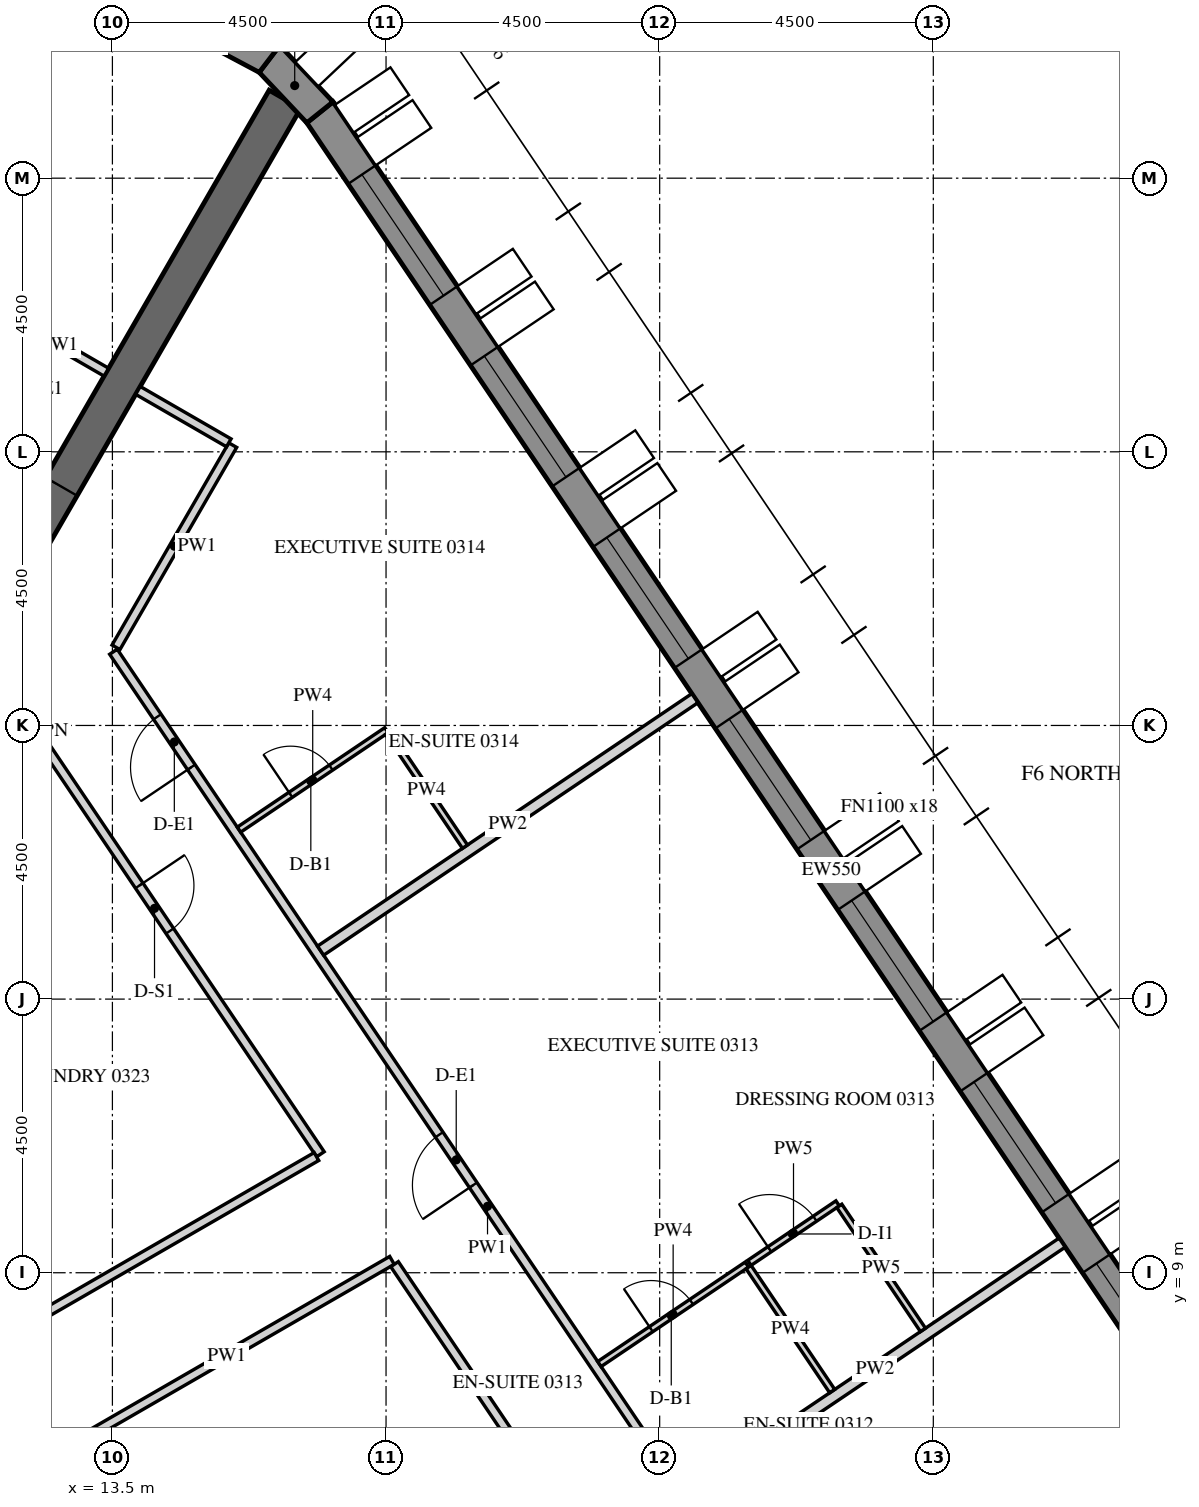
"""IFC4 building model, lengths in metres.
Left out: names, types, materials, properties, quantities, classifications, styles, units other than length and angle.
Written with IfcOpenShell. Run it as: python <this file> out.ifc"""

import sys

from ifc_helpers import new_model, si_unit, direction, frame, frame_2d, origin, place, context, subcontext, project, spatial, polyline, rectangle, outline, extrude, element, fill, save


model = new_model("IFC4")
c1 = context("Model", 3, precision=1e-05, world=origin(), true_north=direction((0.0, 1.0)))
c2 = subcontext(c1, "Body", "Model", "MODEL_VIEW")
j1 = project(units=[si_unit("LENGTHUNIT", "METRE"), si_unit("PLANEANGLEUNIT", "RADIAN")], contexts=[c1])
p1 = place(None, origin())
s1 = spatial("IfcSite", under=j1, at=p1, CompositionType="ELEMENT")
p2 = place(p1, origin())
s2 = spatial("IfcBuilding", under=s1, at=p2, CompositionType="ELEMENT")
p3 = place(p2, frame((0.0, 0.0, 60.9)))
s3 = spatial("IfcBuildingStorey", under=s2, at=p3, CompositionType="ELEMENT", Elevation=60.9)
p4 = place(p3, frame((33.728, 3.153, -0.15), z_axis=(0.0, 0.0, 1.0), x_axis=(-0.559192411416, 0.82903790445, 0.0)))
e1 = element("IfcWall", 1, at=p4, inside=s3, PredefinedType="SOLIDWALL", context=c2, shape_type="SweptSolid", body=[
    extrude(outline(polyline([(-0.026, -0.275), (30.093, -0.275), (30.048, 0.275), (0.026, 0.275), (-0.026, -0.275)])), origin(), (0.0, 0.0, 1.0), 3.9),
])
p5 = place(p4, frame((1.236, 0.0, 1.05)))
e2 = element("IfcOpeningElement", 2, at=p5, cuts=e1, PredefinedType="OPENING", context=c2, shape_type="SweptSolid", body=[
    extrude(rectangle(XDim=2.4, YDim=2.4, at=frame_2d((1.2, 1.2))), frame((0.0, 0.285, 0.0), z_axis=(0.0, -1.0, 0.0), x_axis=(1.0, 0.0, 0.0)), (0.0, 0.0, 1.0), 0.57),
])
p6 = place(p4, frame((4.835, 0.0, 1.05)))
e3 = element("IfcOpeningElement", 3, at=p6, cuts=e1, PredefinedType="OPENING", context=c2, shape_type="SweptSolid", body=[
    extrude(rectangle(XDim=2.4, YDim=2.4, at=frame_2d((1.2, 1.2))), frame((0.0, 0.285, 0.0), z_axis=(0.0, -1.0, 0.0), x_axis=(1.0, 0.0, 0.0)), (0.0, 0.0, 1.0), 0.57),
])
p7 = place(p4, frame((8.436, 0.0, 1.05)))
e4 = element("IfcOpeningElement", 4, at=p7, cuts=e1, PredefinedType="OPENING", context=c2, shape_type="SweptSolid", body=[
    extrude(rectangle(XDim=2.4, YDim=2.4, at=frame_2d((1.2, 1.2))), frame((0.0, 0.285, 0.0), z_axis=(0.0, -1.0, 0.0), x_axis=(1.0, 0.0, 0.0)), (0.0, 0.0, 1.0), 0.57),
])
p8 = place(p4, frame((12.035, 0.0, 1.05)))
e5 = element("IfcOpeningElement", 5, at=p8, cuts=e1, PredefinedType="OPENING", context=c2, shape_type="SweptSolid", body=[
    extrude(rectangle(XDim=2.4, YDim=2.4, at=frame_2d((1.2, 1.2))), frame((0.0, 0.285, 0.0), z_axis=(0.0, -1.0, 0.0), x_axis=(1.0, 0.0, 0.0)), (0.0, 0.0, 1.0), 0.57),
])
p9 = place(p4, frame((15.635, 0.0, 1.05)))
e6 = element("IfcOpeningElement", 6, at=p9, cuts=e1, PredefinedType="OPENING", context=c2, shape_type="SweptSolid", body=[
    extrude(rectangle(XDim=2.4, YDim=2.4, at=frame_2d((1.2, 1.2))), frame((0.0, 0.285, 0.0), z_axis=(0.0, -1.0, 0.0), x_axis=(1.0, 0.0, 0.0)), (0.0, 0.0, 1.0), 0.57),
])
p10 = place(p4, frame((19.236, 0.0, 1.05)))
e7 = element("IfcOpeningElement", 7, at=p10, cuts=e1, PredefinedType="OPENING", context=c2, shape_type="SweptSolid", body=[
    extrude(rectangle(XDim=2.4, YDim=2.4, at=frame_2d((1.2, 1.2))), frame((0.0, 0.285, 0.0), z_axis=(0.0, -1.0, 0.0), x_axis=(1.0, 0.0, 0.0)), (0.0, 0.0, 1.0), 0.57),
])
p11 = place(p4, frame((22.835, 0.0, 1.05)))
e8 = element("IfcOpeningElement", 8, at=p11, cuts=e1, PredefinedType="OPENING", context=c2, shape_type="SweptSolid", body=[
    extrude(rectangle(XDim=2.4, YDim=2.4, at=frame_2d((1.2, 1.2))), frame((0.0, 0.285, 0.0), z_axis=(0.0, -1.0, 0.0), x_axis=(1.0, 0.0, 0.0)), (0.0, 0.0, 1.0), 0.57),
])
p12 = place(p4, frame((26.436, 0.0, 1.05)))
e9 = element("IfcOpeningElement", 9, at=p12, cuts=e1, PredefinedType="OPENING", context=c2, shape_type="SweptSolid", body=[
    extrude(rectangle(XDim=2.4, YDim=2.4, at=frame_2d((1.2, 1.2))), frame((0.0, 0.285, 0.0), z_axis=(0.0, -1.0, 0.0), x_axis=(1.0, 0.0, 0.0)), (0.0, 0.0, 1.0), 0.57),
])
p13 = place(p3, frame((16.913, 28.083, -0.15), z_axis=(0.0, 0.0, 1.0), x_axis=(-0.686196220404, 0.727416488061, 0.0)))
e10 = element("IfcWall", 10, at=p13, inside=s3, PredefinedType="SOLIDWALL", context=c2, shape_type="SweptSolid", body=[
    extrude(outline(polyline([(-0.022, -0.275), (1.253, -0.275), (1.163, 0.275), (0.022, 0.275), (-0.022, -0.275)])), origin(), (0.0, 0.0, 1.0), 3.9),
])
p14 = place(p3, frame((16.083, 28.962, -0.15), z_axis=(0.0, 0.0, 1.0), x_axis=(-0.882995347911, 0.469381737574, 0.0)))
e11 = element("IfcWall", 11, at=p14, inside=s3, PredefinedType="SOLIDWALL", context=c2, shape_type="SweptSolid", body=[
    extrude(outline(polyline([(-0.045, -0.275), (1.253, -0.275), (1.163, 0.275), (0.045, 0.275), (-0.045, -0.275)])), origin(), (0.0, 0.0, 1.0), 3.9),
])
p15 = place(p3, frame((15.819, 0.0, -0.15), z_axis=(0.0, 0.0, 1.0), x_axis=(-0.499999880136, 0.866025472988, 0.0)))
e12 = element("IfcWall", 12, at=p15, inside=s3, PredefinedType="SHEAR", context=c2, shape_type="SweptSolid", body=[
    extrude(outline(polyline([(-0.173, -0.3), (15.993, -0.3), (15.646, 0.3), (0.173, 0.3), (-0.173, -0.3)])), origin(), (0.0, 0.0, 1.0), 3.9),
])
p16 = place(p15, frame((6.981, 0.0, 0.15)))
e13 = element("IfcOpeningElement", 13, at=p16, cuts=e12, PredefinedType="OPENING", context=c2, shape_type="SweptSolid", body=[
    extrude(rectangle(XDim=1.8, YDim=2.4, at=frame_2d((0.9, 1.2))), frame((0.0, 0.31, 0.0), z_axis=(0.0, -1.0, 0.0), x_axis=(1.0, 0.0, 0.0)), (0.0, 0.0, 1.0), 0.62),
])
p17 = place(p3, frame((8.083, 14.0, -0.15), z_axis=(0.0, 0.0, 1.0), x_axis=(0.499997680643, 0.866026742862, 0.0)))
e14 = element("IfcWall", 14, at=p17, inside=s3, PredefinedType="SHEAR", context=c2, shape_type="SweptSolid", body=[
    extrude(rectangle(XDim=16.509, YDim=0.6, at=frame_2d((8.254, 0.0))), origin(), (0.0, 0.0, 1.0), 3.9),
])
p18 = place(p17, frame((7.354, 0.0, 0.15)))
e15 = element("IfcOpeningElement", 15, at=p18, cuts=e14, PredefinedType="OPENING", context=c2, shape_type="SweptSolid", body=[
    extrude(rectangle(XDim=1.8, YDim=2.4, at=frame_2d((0.9, 1.2))), frame((0.0, 0.31, 0.0), z_axis=(0.0, -1.0, 0.0), x_axis=(1.0, 0.0, 0.0)), (0.0, 0.0, 1.0), 0.62),
])
p19 = place(p3, frame((13.4, 23.81, 0.0), z_axis=(0.0, 0.0, 1.0), x_axis=(-0.865989075817, 0.500062916607, 0.0)))
e16 = element("IfcWall", 16, at=p19, inside=s3, PredefinedType="PARTITIONING", context=c2, shape_type="SweptSolid", body=[
    extrude(rectangle(XDim=1.8, YDim=0.15, at=frame_2d((0.9, 0.0))), origin(), (0.0, 0.0, 1.0), 2.988),
])
p20 = place(p3, frame((25.821, 0.972, 0.0), z_axis=(0.0, 0.0, 1.0), x_axis=(-0.559201442833, 0.829031812619, 0.0)))
e17 = element("IfcWall", 17, at=p20, inside=s3, PredefinedType="PARTITIONING", context=c2, shape_type="SweptSolid", body=[
    extrude(rectangle(XDim=22.002, YDim=0.15, at=frame_2d((11.001, 0.0))), origin(), (0.0, 0.0, 1.0), 2.988),
])
p21 = place(p20, frame((0.769, 0.0, 0.0)))
e18 = element("IfcOpeningElement", 18, at=p21, cuts=e17, PredefinedType="OPENING", context=c2, shape_type="SweptSolid", body=[
    extrude(rectangle(XDim=1.0, YDim=2.1, at=frame_2d((0.5, 1.05))), frame((0.0, 0.085, 0.0), z_axis=(0.0, -1.0, 0.0), x_axis=(1.0, 0.0, 0.0)), (0.0, 0.0, 1.0), 0.17),
])
p22 = place(p20, frame((11.421, 0.0, 0.0)))
e19 = element("IfcOpeningElement", 19, at=p22, cuts=e17, PredefinedType="OPENING", context=c2, shape_type="SweptSolid", body=[
    extrude(rectangle(XDim=1.0, YDim=2.1, at=frame_2d((0.5, 1.05))), frame((0.0, 0.085, 0.0), z_axis=(0.0, -1.0, 0.0), x_axis=(1.0, 0.0, 0.0)), (0.0, 0.0, 1.0), 0.17),
])
p23 = place(p20, frame((19.711, 0.0, 0.0)))
e20 = element("IfcOpeningElement", 20, at=p23, cuts=e17, PredefinedType="OPENING", context=c2, shape_type="SweptSolid", body=[
    extrude(rectangle(XDim=1.0, YDim=2.1, at=frame_2d((0.5, 1.05))), frame((0.0, 0.085, 0.0), z_axis=(0.0, -1.0, 0.0), x_axis=(1.0, 0.0, 0.0)), (0.0, 0.0, 1.0), 0.17),
])
p24 = place(p3, frame((13.559, 19.285, 0.0), z_axis=(0.0, 0.0, 1.0), x_axis=(0.499975646431, 0.866039463868, 0.0)))
e21 = element("IfcWall", 21, at=p24, inside=s3, PredefinedType="PARTITIONING", context=c2, shape_type="SweptSolid", body=[
    extrude(rectangle(XDim=3.84, YDim=0.15, at=frame_2d((1.92, 0.0))), origin(), (0.0, 0.0, 1.0), 2.988),
])
p25 = place(p3, frame((15.414, 22.648, 0.0), z_axis=(0.0, 0.0, 1.0), x_axis=(-0.866074815912, 0.499914405916, 0.0)))
e22 = element("IfcWall", 22, at=p25, inside=s3, PredefinedType="PARTITIONING", context=c2, shape_type="SweptSolid", body=[
    extrude(rectangle(XDim=1.725, YDim=0.15, at=frame_2d((0.862, 0.0))), origin(), (0.0, 0.0, 1.0), 2.988),
])
p26 = place(p3, frame((12.664, 6.066, 0.0), z_axis=(0.0, 0.0, 1.0), x_axis=(0.866036561919, 0.499980673046, 0.0)))
e23 = element("IfcWall", 23, at=p26, inside=s3, PredefinedType="PARTITIONING", context=c2, shape_type="SweptSolid", body=[
    extrude(rectangle(XDim=6.275, YDim=0.15, at=frame_2d((3.137, 0.0))), origin(), (0.0, 0.0, 1.0), 2.988),
])
p27 = place(p3, frame((18.14, 9.141, 0.0), z_axis=(0.0, 0.0, 1.0), x_axis=(0.55918799196, -0.829040885389, 0.0)))
e24 = element("IfcWall", 24, at=p27, inside=s3, PredefinedType="PARTITIONING", context=c2, shape_type="SweptSolid", body=[
    extrude(rectangle(XDim=10.025, YDim=0.15, at=frame_2d((5.013, 0.0))), origin(), (0.0, 0.0, 1.0), 2.988),
])
p28 = place(p3, frame((11.465, 19.037, 0.0), z_axis=(0.0, 0.0, 1.0), x_axis=(0.559196064773, -0.829035440221, 0.0)))
e25 = element("IfcWall", 25, at=p28, inside=s3, PredefinedType="PARTITIONING", context=c2, shape_type="SweptSolid", body=[
    extrude(rectangle(XDim=9.757, YDim=0.15, at=frame_2d((4.878, 0.0))), origin(), (0.0, 0.0, 1.0), 2.988),
])
p29 = place(p28, frame((4.428, 0.0, 0.0)))
e26 = element("IfcOpeningElement", 26, at=p29, cuts=e25, PredefinedType="OPENING", context=c2, shape_type="SweptSolid", body=[
    extrude(rectangle(XDim=0.9, YDim=2.1, at=frame_2d((0.45, 1.05))), frame((0.0, 0.085, 0.0), z_axis=(0.0, -1.0, 0.0), x_axis=(1.0, 0.0, 0.0)), (0.0, 0.0, 1.0), 0.17),
])
p30 = place(p3, frame((16.855, 10.911, 0.0), z_axis=(0.0, 0.0, 1.0), x_axis=(-0.866020343444, -0.500008764664, 0.0)))
e27 = element("IfcWall", 27, at=p30, inside=s3, PredefinedType="PARTITIONING", context=c2, shape_type="SweptSolid", body=[
    extrude(rectangle(XDim=6.053, YDim=0.15, at=frame_2d((3.026, 0.0))), origin(), (0.0, 0.0, 1.0), 2.988),
])
p31 = place(p3, frame((23.159, 5.053, 0.0), z_axis=(0.0, 0.0, 1.0), x_axis=(0.829047014003, 0.559178905694, 0.0)))
e28 = element("IfcWall", 28, at=p31, inside=s3, PredefinedType="PARTITIONING", context=c2, shape_type="SweptSolid", body=[
    extrude(rectangle(XDim=2.725, YDim=0.1, at=frame_2d((1.362, 0.0))), origin(), (0.0, 0.0, 1.0), 2.988),
])
p32 = place(p3, frame((25.446, 6.535, 0.0), z_axis=(0.0, 0.0, 1.0), x_axis=(0.559176864802, -0.829048390548, 0.0)))
e29 = element("IfcWall", 29, at=p32, inside=s3, PredefinedType="PARTITIONING", context=c2, shape_type="SweptSolid", body=[
    extrude(rectangle(XDim=2.55, YDim=0.1, at=frame_2d((1.275, 0.0))), origin(), (0.0, 0.0, 1.0), 2.988),
])
p33 = place(p3, frame((29.119, 9.495, 0.0), z_axis=(0.0, 0.0, 1.0), x_axis=(-0.829038452737, -0.559191598545, 0.0)))
e30 = element("IfcWall", 30, at=p33, inside=s3, PredefinedType="PARTITIONING", context=c2, shape_type="SweptSolid", body=[
    extrude(rectangle(XDim=7.425, YDim=0.18, at=frame_2d((3.713, 0.0))), origin(), (0.0, 0.0, 1.0), 2.988),
])
p34 = place(p3, frame((21.509, 7.499, 0.0), z_axis=(0.0, 0.0, 1.0), x_axis=(0.829033436212, 0.559199035802, 0.0)))
e31 = element("IfcWall", 31, at=p34, inside=s3, PredefinedType="PARTITIONING", context=c2, shape_type="SweptSolid", body=[
    extrude(rectangle(XDim=2.925, YDim=0.1, at=frame_2d((1.462, 0.0))), origin(), (0.0, 0.0, 1.0), 2.988),
])
p35 = place(p34, frame((1.025, 0.0, 0.0)))
e32 = element("IfcOpeningElement", 32, at=p35, cuts=e31, PredefinedType="OPENING", context=c2, shape_type="SweptSolid", body=[
    extrude(rectangle(XDim=0.8, YDim=2.1, at=frame_2d((0.4, 1.05))), frame((0.0, 0.06, 0.0), z_axis=(0.0, -1.0, 0.0), x_axis=(1.0, 0.0, 0.0)), (0.0, 0.0, 1.0), 0.12),
])
p36 = place(p3, frame((23.975, 9.162, 0.0), z_axis=(0.0, 0.0, 1.0), x_axis=(0.829011970545, 0.559230858138, 0.0)))
e33 = element("IfcWall", 33, at=p36, inside=s3, PredefinedType="PARTITIONING", context=c2, shape_type="SweptSolid", body=[
    extrude(rectangle(XDim=1.75, YDim=0.1, at=frame_2d((0.875, 0.0))), origin(), (0.0, 0.0, 1.0), 2.988),
])
p37 = place(p36, frame((0.4, 0.0, 0.0)))
e34 = element("IfcOpeningElement", 34, at=p37, cuts=e33, PredefinedType="OPENING", context=c2, shape_type="SweptSolid", body=[
    extrude(rectangle(XDim=0.9, YDim=2.1, at=frame_2d((0.45, 1.05))), frame((0.0, 0.06, 0.0), z_axis=(0.0, -1.0, 0.0), x_axis=(1.0, 0.0, 0.0)), (0.0, 0.0, 1.0), 0.12),
])
p38 = place(p3, frame((25.454, 10.099, 0.0), z_axis=(0.0, 0.0, 1.0), x_axis=(0.559135322609, -0.829076408427, 0.0)))
e35 = element("IfcWall", 35, at=p38, inside=s3, PredefinedType="PARTITIONING", context=c2, shape_type="SweptSolid", body=[
    extrude(rectangle(XDim=2.46, YDim=0.1, at=frame_2d((1.23, 0.0))), origin(), (0.0, 0.0, 1.0), 2.988),
])
p39 = place(p3, frame((23.079, 18.449, 0.0), z_axis=(0.0, 0.0, 1.0), x_axis=(-0.829038452737, -0.559191598545, 0.0)))
e36 = element("IfcWall", 36, at=p39, inside=s3, PredefinedType="PARTITIONING", context=c2, shape_type="SweptSolid", body=[
    extrude(rectangle(XDim=7.425, YDim=0.18, at=frame_2d((3.713, 0.0))), origin(), (0.0, 0.0, 1.0), 2.988),
])
p40 = place(p3, frame((25.338, 7.053, 0.0), z_axis=(0.0, 0.0, 1.0), x_axis=(-0.559249542518, 0.82899936622, 0.0)))
e37 = element("IfcWall", 37, at=p40, inside=s3, PredefinedType="PARTITIONING", context=c2, shape_type="SweptSolid", body=[
    extrude(rectangle(XDim=2.46, YDim=0.1, at=frame_2d((1.23, 0.0))), origin(), (0.0, 0.0, 1.0), 2.988),
])
p41 = place(p3, frame((15.582, 16.286, 0.0), z_axis=(0.0, 0.0, 1.0), x_axis=(0.829033436212, 0.559199035802, 0.0)))
e38 = element("IfcWall", 38, at=p41, inside=s3, PredefinedType="PARTITIONING", context=c2, shape_type="SweptSolid", body=[
    extrude(rectangle(XDim=2.925, YDim=0.1, at=frame_2d((1.462, 0.0))), origin(), (0.0, 0.0, 1.0), 2.988),
])
p42 = place(p41, frame((1.025, 0.0, 0.0)))
e39 = element("IfcOpeningElement", 39, at=p42, cuts=e38, PredefinedType="OPENING", context=c2, shape_type="SweptSolid", body=[
    extrude(rectangle(XDim=0.8, YDim=2.1, at=frame_2d((0.4, 1.05))), frame((0.0, 0.06, 0.0), z_axis=(0.0, -1.0, 0.0), x_axis=(1.0, 0.0, 0.0)), (0.0, 0.0, 1.0), 0.12),
])
p43 = place(p3, frame((18.034, 17.881, 0.0), z_axis=(0.0, 0.0, 1.0), x_axis=(0.559253906445, -0.828996422264, 0.0)))
e40 = element("IfcWall", 40, at=p43, inside=s3, PredefinedType="PARTITIONING", context=c2, shape_type="SweptSolid", body=[
    extrude(rectangle(XDim=2.26, YDim=0.1, at=frame_2d((1.13, 0.0))), origin(), (0.0, 0.0, 1.0), 2.988),
])
p44 = place(p6, frame((0.0, 0.205, 0.0)))
e41 = element("IfcWindow", 41, at=p44, inside=s3, PartitioningType="DOUBLE_PANEL_VERTICAL", PredefinedType="WINDOW", context=c2, shape_type="SweptSolid", body=[
    extrude(rectangle(XDim=2.4, YDim=2.4, at=frame_2d((1.2, 1.2))), frame((0.0, 0.03, 0.0), z_axis=(0.0, -1.0, 0.0), x_axis=(1.0, 0.0, 0.0)), (0.0, 0.0, 1.0), 0.06),
])
fill(e3, e41)
p45 = place(p7, frame((0.0, 0.205, 0.0)))
e42 = element("IfcWindow", 42, at=p45, inside=s3, PartitioningType="DOUBLE_PANEL_VERTICAL", PredefinedType="WINDOW", context=c2, shape_type="SweptSolid", body=[
    extrude(rectangle(XDim=2.4, YDim=2.4, at=frame_2d((1.2, 1.2))), frame((0.0, 0.03, 0.0), z_axis=(0.0, -1.0, 0.0), x_axis=(1.0, 0.0, 0.0)), (0.0, 0.0, 1.0), 0.06),
])
fill(e4, e42)
p46 = place(p8, frame((0.0, 0.205, 0.0)))
e43 = element("IfcWindow", 43, at=p46, inside=s3, PartitioningType="DOUBLE_PANEL_VERTICAL", PredefinedType="WINDOW", context=c2, shape_type="SweptSolid", body=[
    extrude(rectangle(XDim=2.4, YDim=2.4, at=frame_2d((1.2, 1.2))), frame((0.0, 0.03, 0.0), z_axis=(0.0, -1.0, 0.0), x_axis=(1.0, 0.0, 0.0)), (0.0, 0.0, 1.0), 0.06),
])
fill(e5, e43)
p47 = place(p9, frame((0.0, 0.205, 0.0)))
e44 = element("IfcWindow", 44, at=p47, inside=s3, PartitioningType="DOUBLE_PANEL_VERTICAL", PredefinedType="WINDOW", context=c2, shape_type="SweptSolid", body=[
    extrude(rectangle(XDim=2.4, YDim=2.4, at=frame_2d((1.2, 1.2))), frame((0.0, 0.03, 0.0), z_axis=(0.0, -1.0, 0.0), x_axis=(1.0, 0.0, 0.0)), (0.0, 0.0, 1.0), 0.06),
])
fill(e6, e44)
p48 = place(p10, frame((0.0, 0.205, 0.0)))
e45 = element("IfcWindow", 45, at=p48, inside=s3, PartitioningType="DOUBLE_PANEL_VERTICAL", PredefinedType="WINDOW", context=c2, shape_type="SweptSolid", body=[
    extrude(rectangle(XDim=2.4, YDim=2.4, at=frame_2d((1.2, 1.2))), frame((0.0, 0.03, 0.0), z_axis=(0.0, -1.0, 0.0), x_axis=(1.0, 0.0, 0.0)), (0.0, 0.0, 1.0), 0.06),
])
fill(e7, e45)
p49 = place(p11, frame((0.0, 0.205, 0.0)))
e46 = element("IfcWindow", 46, at=p49, inside=s3, PartitioningType="DOUBLE_PANEL_VERTICAL", PredefinedType="WINDOW", context=c2, shape_type="SweptSolid", body=[
    extrude(rectangle(XDim=2.4, YDim=2.4, at=frame_2d((1.2, 1.2))), frame((0.0, 0.03, 0.0), z_axis=(0.0, -1.0, 0.0), x_axis=(1.0, 0.0, 0.0)), (0.0, 0.0, 1.0), 0.06),
])
fill(e8, e46)
p50 = place(p12, frame((0.0, 0.205, 0.0)))
e47 = element("IfcWindow", 47, at=p50, inside=s3, PartitioningType="DOUBLE_PANEL_VERTICAL", PredefinedType="WINDOW", context=c2, shape_type="SweptSolid", body=[
    extrude(rectangle(XDim=2.4, YDim=2.4, at=frame_2d((1.2, 1.2))), frame((0.0, 0.03, 0.0), z_axis=(0.0, -1.0, 0.0), x_axis=(1.0, 0.0, 0.0)), (0.0, 0.0, 1.0), 0.06),
])
fill(e9, e47)
p51 = place(p18, origin())
e48 = element("IfcDoor", 48, at=p51, inside=s3, OperationType="DOUBLE_DOOR_SINGLE_SWING", PredefinedType="DOOR", context=c2, shape_type="SweptSolid", body=[
    extrude(rectangle(XDim=1.8, YDim=2.4, at=frame_2d((0.9, 1.2))), frame((0.0, 0.025, 0.0), z_axis=(0.0, -1.0, 0.0), x_axis=(1.0, 0.0, 0.0)), (0.0, 0.0, 1.0), 0.05),
])
fill(e15, e48)
p52 = place(p22, origin())
e49 = element("IfcDoor", 49, at=p52, inside=s3, OperationType="SINGLE_SWING_LEFT", PredefinedType="DOOR", context=c2, shape_type="SweptSolid", body=[
    extrude(rectangle(XDim=1.0, YDim=2.1, at=frame_2d((0.5, 1.05))), frame((0.0, 0.025, 0.0), z_axis=(0.0, -1.0, 0.0), x_axis=(1.0, 0.0, 0.0)), (0.0, 0.0, 1.0), 0.05),
])
fill(e19, e49)
p53 = place(p35, origin())
e50 = element("IfcDoor", 50, at=p53, inside=s3, OperationType="SINGLE_SWING_RIGHT", PredefinedType="DOOR", context=c2, shape_type="SweptSolid", body=[
    extrude(rectangle(XDim=0.8, YDim=2.1, at=frame_2d((0.4, 1.05))), frame((0.0, 0.025, 0.0), z_axis=(0.0, -1.0, 0.0), x_axis=(1.0, 0.0, 0.0)), (0.0, 0.0, 1.0), 0.05),
])
fill(e32, e50)
p54 = place(p37, origin())
e51 = element("IfcDoor", 51, at=p54, inside=s3, OperationType="SINGLE_SWING_RIGHT", PredefinedType="DOOR", context=c2, shape_type="SweptSolid", body=[
    extrude(rectangle(XDim=0.9, YDim=2.1, at=frame_2d((0.45, 1.05))), frame((0.0, 0.025, 0.0), z_axis=(0.0, -1.0, 0.0), x_axis=(1.0, 0.0, 0.0)), (0.0, 0.0, 1.0), 0.05),
])
fill(e34, e51)
p55 = place(p23, origin())
e52 = element("IfcDoor", 52, at=p55, inside=s3, OperationType="SINGLE_SWING_RIGHT", PredefinedType="DOOR", context=c2, shape_type="SweptSolid", body=[
    extrude(rectangle(XDim=1.0, YDim=2.1, at=frame_2d((0.5, 1.05))), frame((0.0, 0.025, 0.0), z_axis=(0.0, -1.0, 0.0), x_axis=(1.0, 0.0, 0.0)), (0.0, 0.0, 1.0), 0.05),
])
fill(e20, e52)
p56 = place(p42, origin())
e53 = element("IfcDoor", 53, at=p56, inside=s3, OperationType="SINGLE_SWING_RIGHT", PredefinedType="DOOR", context=c2, shape_type="SweptSolid", body=[
    extrude(rectangle(XDim=0.8, YDim=2.1, at=frame_2d((0.4, 1.05))), frame((0.0, 0.025, 0.0), z_axis=(0.0, -1.0, 0.0), x_axis=(1.0, 0.0, 0.0)), (0.0, 0.0, 1.0), 0.05),
])
fill(e39, e53)
p57 = place(p29, origin())
e54 = element("IfcDoor", 54, at=p57, inside=s3, OperationType="SINGLE_SWING_RIGHT", PredefinedType="DOOR", context=c2, shape_type="SweptSolid", body=[
    extrude(rectangle(XDim=0.9, YDim=2.1, at=frame_2d((0.45, 1.05))), frame((0.0, 0.025, 0.0), z_axis=(0.0, -1.0, 0.0), x_axis=(1.0, 0.0, 0.0)), (0.0, 0.0, 1.0), 0.05),
])
fill(e26, e54)
save(model, sys.argv[1])
